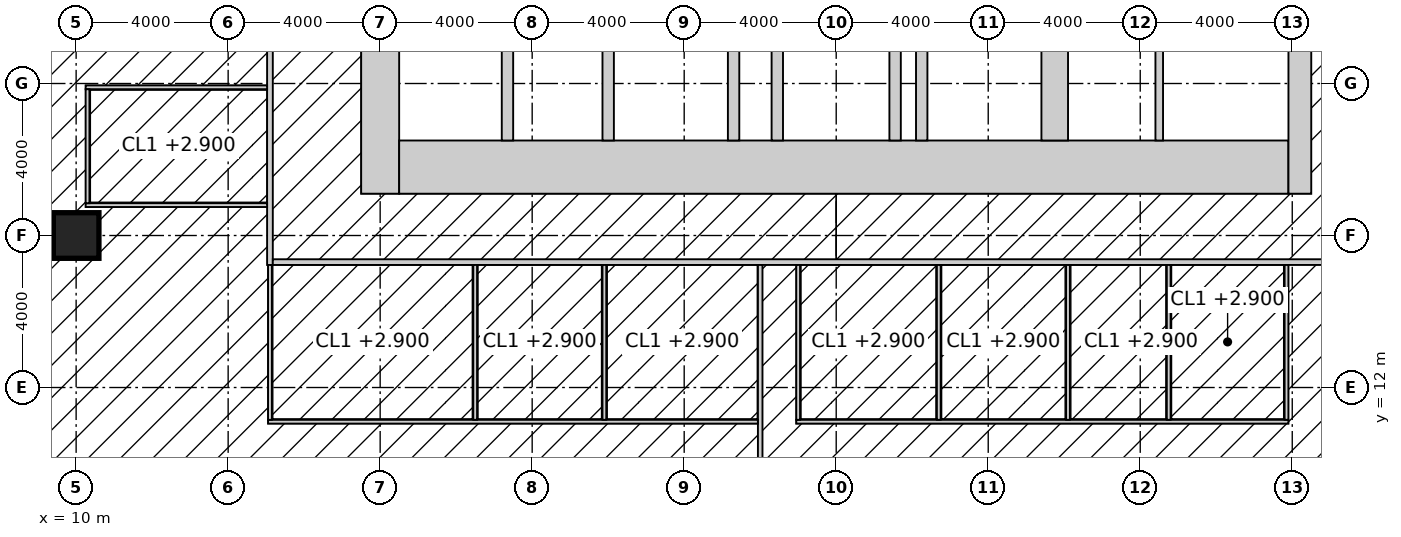
"""IFC4 building model, lengths in metres.
Left out: names, types, materials, properties, quantities, classifications, styles, units other than length and angle.
Written with IfcOpenShell. Run it as: python <this file> out.ifc"""

import sys

from ifc_helpers import new_model, si_unit, direction, frame, frame_2d, origin, origin_2d, place, context, subcontext, project, spatial, rectangle, hollow_rectangle, extrude, element, fill, save


model = new_model("IFC4")
c1 = context("Model", 3, precision=1e-05, world=origin(), true_north=direction((0.0, 1.0)))
c2 = subcontext(c1, "Body", "Model", "MODEL_VIEW")
j1 = project(units=[si_unit("LENGTHUNIT", "METRE"), si_unit("PLANEANGLEUNIT", "RADIAN")], contexts=[c1])
p1 = place(None, origin())
s1 = spatial("IfcSite", under=j1, at=p1, CompositionType="ELEMENT")
p2 = place(p1, origin())
s2 = spatial("IfcBuilding", under=s1, at=p2, CompositionType="ELEMENT")
p3 = place(p2, frame((0.0, 0.0, 51.0)))
s3 = spatial("IfcBuildingStorey", under=s2, at=p3, CompositionType="ELEMENT", Elevation=51.0)
p4 = place(p3, frame((10.0, 16.0, 0.0), z_axis=(0.0, 0.0, 1.0), x_axis=(1.0, 0.0, 0.0)))
e1 = element("IfcColumn", 1, at=p4, inside=s3, PredefinedType="COLUMN", context=c2, shape_type="SweptSolid", body=[
    extrude(hollow_rectangle(XDim=1.2, YDim=1.2, WallThickness=0.1, at=origin_2d()), origin(), (0.0, 0.0, 1.0), 4.0),
])
p5 = place(p3, frame((18.0, 17.1, -0.15), z_axis=(0.0, 0.0, 1.0), x_axis=(0.0, 1.0, 0.0)))
e2 = element("IfcWall", 2, at=p5, inside=s3, PredefinedType="SHEAR", context=c2, shape_type="SweptSolid", body=[
    extrude(rectangle(XDim=19.8, YDim=1.0, at=frame_2d((9.9, 0.0))), origin(), (0.0, 0.0, 1.0), 4.0),
])
p6 = place(p3, frame((18.5, 17.8, -0.15), z_axis=(0.0, 0.0, 1.0), x_axis=(1.0, 0.0, 0.0)))
e3 = element("IfcWall", 3, at=p6, inside=s3, PredefinedType="SHEAR", context=c2, shape_type="SweptSolid", body=[
    extrude(rectangle(XDim=23.4, YDim=1.4, at=frame_2d((11.7, 0.0))), origin(), (0.0, 0.0, 1.0), 4.0),
])
p7 = place(p6, frame((3.45, 0.0, 0.15)))
e4 = element("IfcOpeningElement", 4, at=p7, cuts=e3, PredefinedType="OPENING", context=c2, shape_type="SweptSolid", body=[
    extrude(rectangle(XDim=1.5, YDim=2.4, at=frame_2d((0.75, 1.2))), frame((0.0, 0.71, 0.0), z_axis=(0.0, -1.0, 0.0), x_axis=(1.0, 0.0, 0.0)), (0.0, 0.0, 1.0), 1.42),
])
p8 = place(p6, frame((17.9, 0.0, 0.15)))
e5 = element("IfcOpeningElement", 5, at=p8, cuts=e3, PredefinedType="OPENING", context=c2, shape_type="SweptSolid", body=[
    extrude(rectangle(XDim=1.5, YDim=2.4, at=frame_2d((0.75, 1.2))), frame((0.0, 0.71, 0.0), z_axis=(0.0, -1.0, 0.0), x_axis=(1.0, 0.0, 0.0)), (0.0, 0.0, 1.0), 1.42),
])
p9 = place(p6, frame((0.9, 0.0, 0.15)))
e6 = element("IfcOpeningElement", 6, at=p9, cuts=e3, PredefinedType="OPENING", context=c2, shape_type="SweptSolid", body=[
    extrude(rectangle(XDim=1.0, YDim=2.2, at=frame_2d((0.5, 1.1))), frame((0.0, 0.71, 0.0), z_axis=(0.0, -1.0, 0.0), x_axis=(1.0, 0.0, 0.0)), (0.0, 0.0, 1.0), 1.42),
])
p10 = place(p3, frame((42.2, 17.1, -0.15), z_axis=(0.0, 0.0, 1.0), x_axis=(0.0, 1.0, 0.0)))
e7 = element("IfcWall", 7, at=p10, inside=s3, PredefinedType="SHEAR", context=c2, shape_type="SweptSolid", body=[
    extrude(rectangle(XDim=19.8, YDim=0.6, at=frame_2d((9.9, 0.0))), origin(), (0.0, 0.0, 1.0), 4.0),
])
p11 = place(p3, frame((35.75, 18.5, -0.15), z_axis=(0.0, 0.0, 1.0), x_axis=(0.0, 1.0, 0.0)))
e8 = element("IfcWall", 8, at=p11, inside=s3, PredefinedType="SHEAR", context=c2, shape_type="SweptSolid", body=[
    extrude(rectangle(XDim=17.0, YDim=0.7, at=frame_2d((8.5, 0.0))), origin(), (0.0, 0.0, 1.0), 4.0),
])
p12 = place(p11, frame((9.85, 0.0, 0.15)))
e9 = element("IfcOpeningElement", 9, at=p12, cuts=e8, PredefinedType="OPENING", context=c2, shape_type="SweptSolid", body=[
    extrude(rectangle(XDim=1.0, YDim=2.2, at=frame_2d((0.5, 1.1))), frame((0.0, 0.36, 0.0), z_axis=(0.0, -1.0, 0.0), x_axis=(1.0, 0.0, 0.0)), (0.0, 0.0, 1.0), 0.72),
])
p13 = place(p3, frame((24.0, 18.5, -0.15), z_axis=(0.0, 0.0, 1.0), x_axis=(0.0, 1.0, 0.0)))
e10 = element("IfcWall", 10, at=p13, inside=s3, PredefinedType="SHEAR", context=c2, shape_type="SweptSolid", body=[
    extrude(rectangle(XDim=17.0, YDim=0.3, at=frame_2d((8.5, 0.0))), origin(), (0.0, 0.0, 1.0), 4.0),
])
p14 = place(p13, frame((9.6, 0.0, 0.15)))
e11 = element("IfcOpeningElement", 11, at=p14, cuts=e10, PredefinedType="OPENING", context=c2, shape_type="SweptSolid", body=[
    extrude(rectangle(XDim=1.5, YDim=2.4, at=frame_2d((0.75, 1.2))), frame((0.0, 0.16, 0.0), z_axis=(0.0, -1.0, 0.0), x_axis=(1.0, 0.0, 0.0)), (0.0, 0.0, 1.0), 0.32),
])
p15 = place(p3, frame((27.3, 18.5, -0.15), z_axis=(0.0, 0.0, 1.0), x_axis=(0.0, 1.0, 0.0)))
e12 = element("IfcWall", 12, at=p15, inside=s3, PredefinedType="SHEAR", context=c2, shape_type="SweptSolid", body=[
    extrude(rectangle(XDim=7.9, YDim=0.3, at=frame_2d((3.95, 0.0))), origin(), (0.0, 0.0, 1.0), 4.0),
])
p16 = place(p15, frame((6.4, 0.0, 0.15)))
e13 = element("IfcOpeningElement", 13, at=p16, cuts=e12, PredefinedType="OPENING", context=c2, shape_type="SweptSolid", body=[
    extrude(rectangle(XDim=1.0, YDim=2.2, at=frame_2d((0.5, 1.1))), frame((0.0, 0.16, 0.0), z_axis=(0.0, -1.0, 0.0), x_axis=(1.0, 0.0, 0.0)), (0.0, 0.0, 1.0), 0.32),
])
p17 = place(p3, frame((32.25, 18.5, -0.15), z_axis=(0.0, 0.0, 1.0), x_axis=(0.0, 1.0, 0.0)))
e14 = element("IfcWall", 14, at=p17, inside=s3, PredefinedType="SHEAR", context=c2, shape_type="SweptSolid", body=[
    extrude(rectangle(XDim=7.9, YDim=0.3, at=frame_2d((3.95, 0.0))), origin(), (0.0, 0.0, 1.0), 4.0),
])
for number, where, z_axis, x_axis in (
    (15, (28.45, 18.5, -0.15), (0.0, 0.0, 1.0), (0.0, 1.0, 0.0)),
    (16, (31.55, 18.5, -0.15), (0.0, 0.0, 1.0), (0.0, 1.0, 0.0)),
):
    element("IfcWall", number, at=place(p3, frame(where, z_axis=z_axis, x_axis=x_axis)), inside=s3, PredefinedType="SHEAR", context=c2, shape_type="SweptSolid", body=[
        extrude(rectangle(XDim=2.9, YDim=0.3, at=frame_2d((1.45, 0.0))), origin(), (0.0, 0.0, 1.0), 4.0),
    ])
p18 = place(p3, frame((21.35, 18.5, -0.15), z_axis=(0.0, 0.0, 1.0), x_axis=(0.0, 1.0, 0.0)))
e17 = element("IfcWall", 17, at=p18, inside=s3, PredefinedType="SHEAR", context=c2, shape_type="SweptSolid", body=[
    extrude(rectangle(XDim=12.5, YDim=0.3, at=frame_2d((6.25, 0.0))), origin(), (0.0, 0.0, 1.0), 4.0),
])
p19 = place(p18, frame((6.725, 0.0, 0.15)))
e18 = element("IfcOpeningElement", 18, at=p19, cuts=e17, PredefinedType="OPENING", context=c2, shape_type="SweptSolid", body=[
    extrude(rectangle(XDim=1.0, YDim=2.2, at=frame_2d((0.5, 1.1))), frame((0.0, 0.16, 0.0), z_axis=(0.0, -1.0, 0.0), x_axis=(1.0, 0.0, 0.0)), (0.0, 0.0, 1.0), 0.32),
])
p20 = place(p3, frame((38.5, 18.5, -0.15), z_axis=(0.0, 0.0, 1.0), x_axis=(0.0, 1.0, 0.0)))
e19 = element("IfcWall", 19, at=p20, inside=s3, PredefinedType="SOLIDWALL", context=c2, shape_type="SweptSolid", body=[
    extrude(rectangle(XDim=11.5, YDim=0.2, at=frame_2d((5.75, 0.0))), origin(), (0.0, 0.0, 1.0), 4.0),
])
p21 = place(p20, frame((0.875, 0.0, 0.15)))
e20 = element("IfcOpeningElement", 20, at=p21, cuts=e19, PredefinedType="OPENING", context=c2, shape_type="SweptSolid", body=[
    extrude(rectangle(XDim=1.1, YDim=2.2, at=frame_2d((0.55, 1.1))), frame((0.0, 0.11, 0.0), z_axis=(0.0, -1.0, 0.0), x_axis=(1.0, 0.0, 0.0)), (0.0, 0.0, 1.0), 0.22),
])
p22 = place(p20, frame((3.825, 0.0, 0.15)))
e21 = element("IfcOpeningElement", 21, at=p22, cuts=e19, PredefinedType="OPENING", context=c2, shape_type="SweptSolid", body=[
    extrude(rectangle(XDim=1.1, YDim=2.2, at=frame_2d((0.55, 1.1))), frame((0.0, 0.11, 0.0), z_axis=(0.0, -1.0, 0.0), x_axis=(1.0, 0.0, 0.0)), (0.0, 0.0, 1.0), 0.22),
])
p23 = place(p20, frame((6.675, 0.0, 0.15)))
e22 = element("IfcOpeningElement", 22, at=p23, cuts=e19, PredefinedType="OPENING", context=c2, shape_type="SweptSolid", body=[
    extrude(rectangle(XDim=1.1, YDim=2.2, at=frame_2d((0.55, 1.1))), frame((0.0, 0.11, 0.0), z_axis=(0.0, -1.0, 0.0), x_axis=(1.0, 0.0, 0.0)), (0.0, 0.0, 1.0), 0.22),
])
p24 = place(p20, frame((9.575, 0.0, 0.15)))
e23 = element("IfcOpeningElement", 23, at=p24, cuts=e19, PredefinedType="OPENING", context=c2, shape_type="SweptSolid", body=[
    extrude(rectangle(XDim=1.1, YDim=2.2, at=frame_2d((0.55, 1.1))), frame((0.0, 0.11, 0.0), z_axis=(0.0, -1.0, 0.0), x_axis=(1.0, 0.0, 0.0)), (0.0, 0.0, 1.0), 0.22),
])
p25 = place(p3, frame((15.1, 15.225, 0.0), z_axis=(0.0, 0.0, 1.0), x_axis=(0.0, 1.0, 0.0)))
e24 = element("IfcWall", 24, at=p25, inside=s3, PredefinedType="PARTITIONING", context=c2, shape_type="SweptSolid", body=[
    extrude(rectangle(XDim=23.55, YDim=0.15, at=frame_2d((11.775, 0.0))), origin(), (0.0, 0.0, 1.0), 3.85),
])
p26 = place(p25, frame((10.875, 0.0, 0.0)))
e25 = element("IfcOpeningElement", 25, at=p26, cuts=e24, PredefinedType="OPENING", context=c2, shape_type="SweptSolid", body=[
    extrude(rectangle(XDim=1.8, YDim=2.4, at=frame_2d((0.9, 1.2))), frame((0.0, 0.085, 0.0), z_axis=(0.0, -1.0, 0.0), x_axis=(1.0, 0.0, 0.0)), (0.0, 0.0, 1.0), 0.17),
])
p27 = place(p3, frame((15.175, 15.3, 0.0), z_axis=(0.0, 0.0, 1.0), x_axis=(1.0, 0.0, 0.0)))
e26 = element("IfcWall", 26, at=p27, inside=s3, PredefinedType="PARTITIONING", context=c2, shape_type="SweptSolid", body=[
    extrude(rectangle(XDim=29.05, YDim=0.15, at=frame_2d((14.525, 0.0))), origin(), (0.0, 0.0, 1.0), 3.85),
])
p28 = place(p3, frame((28.0, 0.3, 0.0), z_axis=(0.0, 0.0, 1.0), x_axis=(0.0, 1.0, 0.0)))
e27 = element("IfcWall", 27, at=p28, inside=s3, PredefinedType="PARTITIONING", context=c2, shape_type="SweptSolid", body=[
    extrude(rectangle(XDim=14.925, YDim=0.12, at=frame_2d((7.462, 0.0))), origin(), (0.0, 0.0, 1.0), 3.85),
])
p29 = place(p3, frame((15.05, 11.1, 0.0), z_axis=(0.0, 0.0, 1.0), x_axis=(1.0, 0.0, 0.0)))
e28 = element("IfcWall", 28, at=p29, inside=s3, PredefinedType="PARTITIONING", context=c2, shape_type="SweptSolid", body=[
    extrude(rectangle(XDim=12.889, YDim=0.1, at=frame_2d((6.444, 0.0))), origin(), (0.0, 0.0, 1.0), 3.85),
])
p30 = place(p29, frame((2.25, 0.0, 0.0)))
e29 = element("IfcOpeningElement", 29, at=p30, cuts=e28, PredefinedType="OPENING", context=c2, shape_type="SweptSolid", body=[
    extrude(rectangle(XDim=1.0, YDim=2.2, at=frame_2d((0.5, 1.1))), frame((0.0, 0.06, 0.0), z_axis=(0.0, -1.0, 0.0), x_axis=(1.0, 0.0, 0.0)), (0.0, 0.0, 1.0), 0.12),
])
p31 = place(p29, frame((6.65, 0.0, 0.0)))
e30 = element("IfcOpeningElement", 30, at=p31, cuts=e28, PredefinedType="OPENING", context=c2, shape_type="SweptSolid", body=[
    extrude(rectangle(XDim=1.0, YDim=2.2, at=frame_2d((0.5, 1.1))), frame((0.0, 0.06, 0.0), z_axis=(0.0, -1.0, 0.0), x_axis=(1.0, 0.0, 0.0)), (0.0, 0.0, 1.0), 0.12),
])
p32 = place(p29, frame((10.399, 0.0, 0.0)))
e31 = element("IfcOpeningElement", 31, at=p32, cuts=e28, PredefinedType="OPENING", context=c2, shape_type="SweptSolid", body=[
    extrude(rectangle(XDim=1.0, YDim=2.2, at=frame_2d((0.5, 1.1))), frame((0.0, 0.06, 0.0), z_axis=(0.0, -1.0, 0.0), x_axis=(1.0, 0.0, 0.0)), (0.0, 0.0, 1.0), 0.12),
])
p33 = place(p3, frame((28.949, 11.1, 0.0), z_axis=(0.0, 0.0, 1.0), x_axis=(1.0, 0.0, 0.0)))
e32 = element("IfcWall", 32, at=p33, inside=s3, PredefinedType="PARTITIONING", context=c2, shape_type="SweptSolid", body=[
    extrude(rectangle(XDim=12.95, YDim=0.1, at=frame_2d((6.475, 0.0))), origin(), (0.0, 0.0, 1.0), 3.85),
])
p34 = place(p33, frame((1.4, 0.0, 0.0)))
e33 = element("IfcOpeningElement", 33, at=p34, cuts=e32, PredefinedType="OPENING", context=c2, shape_type="SweptSolid", body=[
    extrude(rectangle(XDim=1.0, YDim=2.2, at=frame_2d((0.5, 1.1))), frame((0.0, 0.06, 0.0), z_axis=(0.0, -1.0, 0.0), x_axis=(1.0, 0.0, 0.0)), (0.0, 0.0, 1.0), 0.12),
])
p35 = place(p33, frame((4.95, 0.0, 0.0)))
e34 = element("IfcOpeningElement", 34, at=p35, cuts=e32, PredefinedType="OPENING", context=c2, shape_type="SweptSolid", body=[
    extrude(rectangle(XDim=1.0, YDim=2.2, at=frame_2d((0.5, 1.1))), frame((0.0, 0.06, 0.0), z_axis=(0.0, -1.0, 0.0), x_axis=(1.0, 0.0, 0.0)), (0.0, 0.0, 1.0), 0.12),
])
p36 = place(p33, frame((7.975, 0.0, 0.0)))
e35 = element("IfcOpeningElement", 35, at=p36, cuts=e32, PredefinedType="OPENING", context=c2, shape_type="SweptSolid", body=[
    extrude(rectangle(XDim=1.0, YDim=2.2, at=frame_2d((0.5, 1.1))), frame((0.0, 0.06, 0.0), z_axis=(0.0, -1.0, 0.0), x_axis=(1.0, 0.0, 0.0)), (0.0, 0.0, 1.0), 0.12),
])
p37 = place(p33, frame((10.85, 0.0, 0.0)))
e36 = element("IfcOpeningElement", 36, at=p37, cuts=e32, PredefinedType="OPENING", context=c2, shape_type="SweptSolid", body=[
    extrude(rectangle(XDim=1.0, YDim=2.2, at=frame_2d((0.5, 1.1))), frame((0.0, 0.06, 0.0), z_axis=(0.0, -1.0, 0.0), x_axis=(1.0, 0.0, 0.0)), (0.0, 0.0, 1.0), 0.12),
])
p38 = place(p3, frame((10.25, 16.8, 0.0), z_axis=(0.0, 0.0, 1.0), x_axis=(1.0, 0.0, 0.0)))
e37 = element("IfcWall", 37, at=p38, inside=s3, PredefinedType="PARTITIONING", context=c2, shape_type="SweptSolid", body=[
    extrude(rectangle(XDim=4.775, YDim=0.1, at=frame_2d((2.387, 0.0))), origin(), (0.0, 0.0, 1.0), 3.85),
])
p39 = place(p3, frame((10.25, 19.9, 0.0), z_axis=(0.0, 0.0, 1.0), x_axis=(1.0, 0.0, 0.0)))
e38 = element("IfcWall", 38, at=p39, inside=s3, PredefinedType="PARTITIONING", context=c2, shape_type="SweptSolid", body=[
    extrude(rectangle(XDim=4.775, YDim=0.1, at=frame_2d((2.387, 0.0))), origin(), (0.0, 0.0, 1.0), 2.85),
])
p40 = place(p3, frame((10.3, 16.85, 0.0), z_axis=(0.0, 0.0, 1.0), x_axis=(0.0, 1.0, 0.0)))
e39 = element("IfcWall", 39, at=p40, inside=s3, PredefinedType="PARTITIONING", context=c2, shape_type="SweptSolid", body=[
    extrude(rectangle(XDim=3.0, YDim=0.1, at=frame_2d((1.5, 0.0))), origin(), (0.0, 0.0, 1.0), 2.95),
])
p41 = place(p40, frame((1.0, 0.0, 0.0)))
e40 = element("IfcOpeningElement", 40, at=p41, cuts=e39, PredefinedType="OPENING", context=c2, shape_type="SweptSolid", body=[
    extrude(rectangle(XDim=1.0, YDim=2.2, at=frame_2d((0.5, 1.1))), frame((0.0, 0.06, 0.0), z_axis=(0.0, -1.0, 0.0), x_axis=(1.0, 0.0, 0.0)), (0.0, 0.0, 1.0), 0.12),
])
for number, where, z_axis, x_axis in (
    (41, (15.1, 11.15, 0.0), (0.0, 0.0, 1.0), (0.0, 1.0, 0.0)),
    (42, (20.5, 11.15, 0.0), (0.0, 0.0, 1.0), (0.0, 1.0, 0.0)),
    (43, (23.9, 11.15, 0.0), (0.0, 0.0, 1.0), (0.0, 1.0, 0.0)),
    (44, (28.999, 11.15, 0.0), (0.0, 0.0, 1.0), (0.0, 1.0, 0.0)),
    (45, (32.699, 11.15, 0.0), (0.0, 0.0, 1.0), (0.0, 1.0, 0.0)),
    (46, (36.099, 11.15, 0.0), (0.0, 0.0, 1.0), (0.0, 1.0, 0.0)),
    (47, (38.749, 11.15, 0.0), (0.0, 0.0, 1.0), (0.0, 1.0, 0.0)),
):
    element("IfcWall", number, at=place(p3, frame(where, z_axis=z_axis, x_axis=x_axis)), inside=s3, PredefinedType="PARTITIONING", context=c2, shape_type="SweptSolid", body=[
        extrude(rectangle(XDim=4.075, YDim=0.1, at=frame_2d((2.038, 0.0))), origin(), (0.0, 0.0, 1.0), 3.85),
    ])
p42 = place(p3, frame((41.849, 11.15, 0.0), z_axis=(0.0, 0.0, 1.0), x_axis=(0.0, 1.0, 0.0)))
e48 = element("IfcWall", 48, at=p42, inside=s3, PredefinedType="PARTITIONING", context=c2, shape_type="SweptSolid", body=[
    extrude(rectangle(XDim=4.075, YDim=0.1, at=frame_2d((2.038, 0.0))), origin(), (0.0, 0.0, 1.0), 2.95),
])
p43 = place(p7, origin())
e49 = element("IfcDoor", 49, at=p43, inside=s3, OperationType="DOUBLE_DOOR_DOUBLE_SWING", PredefinedType="DOOR", context=c2, shape_type="SweptSolid", body=[
    extrude(rectangle(XDim=1.5, YDim=2.4, at=frame_2d((0.75, 1.2))), frame((0.0, 0.025, 0.0), z_axis=(0.0, -1.0, 0.0), x_axis=(1.0, 0.0, 0.0)), (0.0, 0.0, 1.0), 0.05),
])
fill(e4, e49)
p44 = place(p8, origin())
e50 = element("IfcDoor", 50, at=p44, inside=s3, OperationType="DOUBLE_DOOR_DOUBLE_SWING", PredefinedType="DOOR", context=c2, shape_type="SweptSolid", body=[
    extrude(rectangle(XDim=1.5, YDim=2.4, at=frame_2d((0.75, 1.2))), frame((0.0, 0.025, 0.0), z_axis=(0.0, -1.0, 0.0), x_axis=(1.0, 0.0, 0.0)), (0.0, 0.0, 1.0), 0.05),
])
fill(e5, e50)
p45 = place(p9, origin())
e51 = element("IfcDoor", 51, at=p45, inside=s3, OperationType="SINGLE_SWING_LEFT", PredefinedType="DOOR", context=c2, shape_type="SweptSolid", body=[
    extrude(rectangle(XDim=1.0, YDim=2.2, at=frame_2d((0.5, 1.1))), frame((0.0, 0.025, 0.0), z_axis=(0.0, -1.0, 0.0), x_axis=(1.0, 0.0, 0.0)), (0.0, 0.0, 1.0), 0.05),
])
fill(e6, e51)
p46 = place(p30, origin())
e52 = element("IfcDoor", 52, at=p46, inside=s3, OperationType="SINGLE_SWING_RIGHT", PredefinedType="DOOR", context=c2, shape_type="SweptSolid", body=[
    extrude(rectangle(XDim=1.0, YDim=2.2, at=frame_2d((0.5, 1.1))), frame((0.0, 0.025, 0.0), z_axis=(0.0, -1.0, 0.0), x_axis=(1.0, 0.0, 0.0)), (0.0, 0.0, 1.0), 0.05),
])
fill(e29, e52)
p47 = place(p31, origin())
e53 = element("IfcDoor", 53, at=p47, inside=s3, OperationType="SINGLE_SWING_LEFT", PredefinedType="DOOR", context=c2, shape_type="SweptSolid", body=[
    extrude(rectangle(XDim=1.0, YDim=2.2, at=frame_2d((0.5, 1.1))), frame((0.0, 0.025, 0.0), z_axis=(0.0, -1.0, 0.0), x_axis=(1.0, 0.0, 0.0)), (0.0, 0.0, 1.0), 0.05),
])
fill(e30, e53)
p48 = place(p32, origin())
e54 = element("IfcDoor", 54, at=p48, inside=s3, OperationType="SINGLE_SWING_LEFT", PredefinedType="DOOR", context=c2, shape_type="SweptSolid", body=[
    extrude(rectangle(XDim=1.0, YDim=2.2, at=frame_2d((0.5, 1.1))), frame((0.0, 0.025, 0.0), z_axis=(0.0, -1.0, 0.0), x_axis=(1.0, 0.0, 0.0)), (0.0, 0.0, 1.0), 0.05),
])
fill(e31, e54)
p49 = place(p34, origin())
e55 = element("IfcDoor", 55, at=p49, inside=s3, OperationType="SINGLE_SWING_RIGHT", PredefinedType="DOOR", context=c2, shape_type="SweptSolid", body=[
    extrude(rectangle(XDim=1.0, YDim=2.2, at=frame_2d((0.5, 1.1))), frame((0.0, 0.025, 0.0), z_axis=(0.0, -1.0, 0.0), x_axis=(1.0, 0.0, 0.0)), (0.0, 0.0, 1.0), 0.05),
])
fill(e33, e55)
p50 = place(p35, origin())
e56 = element("IfcDoor", 56, at=p50, inside=s3, OperationType="SINGLE_SWING_LEFT", PredefinedType="DOOR", context=c2, shape_type="SweptSolid", body=[
    extrude(rectangle(XDim=1.0, YDim=2.2, at=frame_2d((0.5, 1.1))), frame((0.0, 0.025, 0.0), z_axis=(0.0, -1.0, 0.0), x_axis=(1.0, 0.0, 0.0)), (0.0, 0.0, 1.0), 0.05),
])
fill(e34, e56)
p51 = place(p36, origin())
e57 = element("IfcDoor", 57, at=p51, inside=s3, OperationType="SINGLE_SWING_LEFT", PredefinedType="DOOR", context=c2, shape_type="SweptSolid", body=[
    extrude(rectangle(XDim=1.0, YDim=2.2, at=frame_2d((0.5, 1.1))), frame((0.0, 0.025, 0.0), z_axis=(0.0, -1.0, 0.0), x_axis=(1.0, 0.0, 0.0)), (0.0, 0.0, 1.0), 0.05),
])
fill(e35, e57)
p52 = place(p37, origin())
e58 = element("IfcDoor", 58, at=p52, inside=s3, OperationType="SINGLE_SWING_LEFT", PredefinedType="DOOR", context=c2, shape_type="SweptSolid", body=[
    extrude(rectangle(XDim=1.0, YDim=2.2, at=frame_2d((0.5, 1.1))), frame((0.0, 0.025, 0.0), z_axis=(0.0, -1.0, 0.0), x_axis=(1.0, 0.0, 0.0)), (0.0, 0.0, 1.0), 0.05),
])
fill(e36, e58)
p53 = place(p41, origin())
e59 = element("IfcDoor", 59, at=p53, inside=s3, OperationType="SINGLE_SWING_LEFT", PredefinedType="DOOR", context=c2, shape_type="SweptSolid", body=[
    extrude(rectangle(XDim=1.0, YDim=2.2, at=frame_2d((0.5, 1.1))), frame((0.0, 0.025, 0.0), z_axis=(0.0, -1.0, 0.0), x_axis=(1.0, 0.0, 0.0)), (0.0, 0.0, 1.0), 0.05),
])
fill(e40, e59)
p54 = place(p21, origin())
e60 = element("IfcDoor", 60, at=p54, inside=s3, OperationType="DOUBLE_DOOR_SLIDING", PredefinedType="DOOR", context=c2, shape_type="SweptSolid", body=[
    extrude(rectangle(XDim=1.1, YDim=2.2, at=frame_2d((0.55, 1.1))), frame((0.0, 0.025, 0.0), z_axis=(0.0, -1.0, 0.0), x_axis=(1.0, 0.0, 0.0)), (0.0, 0.0, 1.0), 0.05),
])
fill(e20, e60)
save(model, sys.argv[1])
